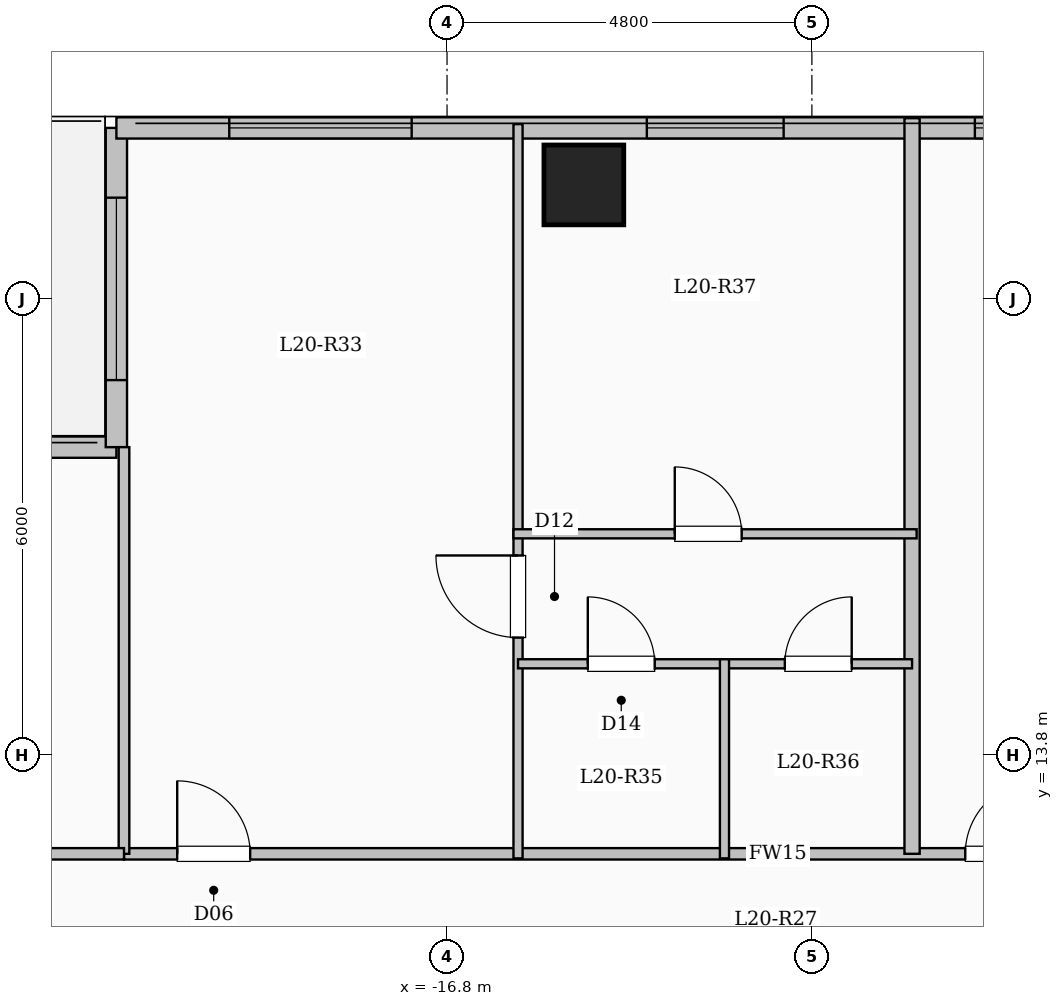
"""IFC4 building model, lengths in metres.
Left out: names, types, materials, properties, quantities, classifications, styles, units other than length and angle.
Written with IfcOpenShell. Run it as: python <this file> out.ifc"""

import sys

from ifc_helpers import new_model, si_unit, direction, frame, frame_2d, origin, origin_2d, place, context, subcontext, project, spatial, rectangle, extrude, element, fill, save


model = new_model("IFC4")
c1 = context("Model", 3, precision=1e-05, world=origin(), true_north=direction((0.0, 1.0)))
c2 = subcontext(c1, "Body", "Model", "MODEL_VIEW")
j1 = project(units=[si_unit("LENGTHUNIT", "METRE"), si_unit("PLANEANGLEUNIT", "RADIAN")], contexts=[c1])
p1 = place(None, origin())
s1 = spatial("IfcSite", under=j1, at=p1, CompositionType="ELEMENT")
p2 = place(p1, origin())
s2 = spatial("IfcBuilding", under=s1, at=p2, CompositionType="ELEMENT")
p3 = place(p2, frame((0.0, 0.0, 78.3)))
s3 = spatial("IfcBuildingStorey", under=s2, at=p3, CompositionType="ELEMENT", Elevation=78.3)
p4 = place(p3, frame((-15.0, 21.3, 0.0), z_axis=(0.0, 0.0, 1.0), x_axis=(1.0, 0.0, 0.0)))
e1 = element("IfcColumn", 1, at=p4, inside=s3, PredefinedType="COLUMN", context=c2, shape_type="SweptSolid", body=[
    extrude(rectangle(XDim=1.05, YDim=1.05, at=origin_2d()), origin(), (0.0, 0.0, 1.0), 3.35),
])
p5 = place(p3, frame((-26.85, 17.85, 0.0), z_axis=(0.0, 0.0, 1.0), x_axis=(1.0, 0.0, 0.0)))
e2 = element("IfcWall", 2, at=p5, inside=s3, PredefinedType="SOLIDWALL", context=c2, shape_type="SweptSolid", body=[
    extrude(rectangle(XDim=5.7, YDim=0.28, at=frame_2d((2.85, 0.0))), origin(), (0.0, 0.0, 1.0), 3.1),
])
p6 = place(p5, frame((2.5, 0.0, 0.0)))
e3 = element("IfcOpeningElement", 3, at=p6, cuts=e2, PredefinedType="OPENING", context=c2, shape_type="SweptSolid", body=[
    extrude(rectangle(XDim=1.1, YDim=2.2, at=frame_2d((0.55, 1.1))), frame((0.0, 0.15, 0.0), z_axis=(0.0, -1.0, 0.0), x_axis=(1.0, 0.0, 0.0)), (0.0, 0.0, 1.0), 0.3),
])
p7 = place(p5, frame((0.755, 0.0, 0.95)))
e4 = element("IfcOpeningElement", 4, at=p7, cuts=e2, PredefinedType="OPENING", context=c2, shape_type="SweptSolid", body=[
    extrude(rectangle(XDim=1.2, YDim=1.5, at=frame_2d((0.6, 0.75))), frame((0.0, 0.15, 0.0), z_axis=(0.0, -1.0, 0.0), x_axis=(1.0, 0.0, 0.0)), (0.0, 0.0, 1.0), 0.3),
])
p8 = place(p3, frame((-21.15, 17.85, 0.0), z_axis=(0.0, 0.0, 1.0), x_axis=(0.0, 1.0, 0.0)))
e5 = element("IfcWall", 5, at=p8, inside=s3, PredefinedType="SOLIDWALL", context=c2, shape_type="SweptSolid", body=[
    extrude(rectangle(XDim=4.2, YDim=0.28, at=frame_2d((2.1, 0.0))), origin(), (0.0, 0.0, 1.0), 3.1),
])
p9 = place(p8, frame((0.882, 0.0, 0.9)))
e6 = element("IfcOpeningElement", 6, at=p9, cuts=e5, PredefinedType="OPENING", context=c2, shape_type="SweptSolid", body=[
    extrude(rectangle(XDim=2.4, YDim=1.8, at=frame_2d((1.2, 0.9))), frame((0.0, 0.15, 0.0), z_axis=(0.0, -1.0, 0.0), x_axis=(1.0, 0.0, 0.0)), (0.0, 0.0, 1.0), 0.3),
])
p10 = place(p3, frame((-21.15, 22.05, 0.0), z_axis=(0.0, 0.0, 1.0), x_axis=(1.0, 0.0, 0.0)))
e7 = element("IfcWall", 7, at=p10, inside=s3, PredefinedType="SOLIDWALL", context=c2, shape_type="SweptSolid", body=[
    extrude(rectangle(XDim=13.8, YDim=0.28, at=frame_2d((6.9, 0.0))), origin(), (0.0, 0.0, 1.0), 3.1),
])
p11 = place(p10, frame((1.485, 0.0, 0.9)))
e8 = element("IfcOpeningElement", 8, at=p11, cuts=e7, PredefinedType="OPENING", context=c2, shape_type="SweptSolid", body=[
    extrude(rectangle(XDim=2.4, YDim=1.8, at=frame_2d((1.2, 0.9))), frame((0.0, 0.15, 0.0), z_axis=(0.0, -1.0, 0.0), x_axis=(1.0, 0.0, 0.0)), (0.0, 0.0, 1.0), 0.3),
])
p12 = place(p10, frame((6.979, 0.0, 0.9)))
e9 = element("IfcOpeningElement", 9, at=p12, cuts=e7, PredefinedType="OPENING", context=c2, shape_type="SweptSolid", body=[
    extrude(rectangle(XDim=1.8, YDim=1.65, at=frame_2d((0.9, 0.825))), frame((0.0, 0.15, 0.0), z_axis=(0.0, -1.0, 0.0), x_axis=(1.0, 0.0, 0.0)), (0.0, 0.0, 1.0), 0.3),
])
p13 = place(p10, frame((11.294, 0.0, 0.9)))
e10 = element("IfcOpeningElement", 10, at=p13, cuts=e7, PredefinedType="OPENING", context=c2, shape_type="SweptSolid", body=[
    extrude(rectangle(XDim=1.8, YDim=1.65, at=frame_2d((0.9, 0.825))), frame((0.0, 0.15, 0.0), z_axis=(0.0, -1.0, 0.0), x_axis=(1.0, 0.0, 0.0)), (0.0, 0.0, 1.0), 0.3),
])
p14 = place(p3, frame((-21.05, 12.5, 0.0), z_axis=(0.0, 0.0, 1.0), x_axis=(1.0, 0.0, 0.0)))
e11 = element("IfcWall", 11, at=p14, inside=s3, PredefinedType="PARTITIONING", context=c2, shape_type="SweptSolid", body=[
    extrude(rectangle(XDim=17.2, YDim=0.15, at=frame_2d((8.6, 0.0))), origin(), (0.0, 0.0, 1.0), 3.1),
])
p15 = place(p14, frame((0.7, 0.0, 0.0)))
e12 = element("IfcOpeningElement", 12, at=p15, cuts=e11, PredefinedType="OPENING", context=c2, shape_type="SweptSolid", body=[
    extrude(rectangle(XDim=0.96, YDim=2.15, at=frame_2d((0.48, 1.075))), frame((0.0, 0.085, 0.0), z_axis=(0.0, -1.0, 0.0), x_axis=(1.0, 0.0, 0.0)), (0.0, 0.0, 1.0), 0.17),
])
p16 = place(p14, frame((11.068, 0.0, 0.0)))
e13 = element("IfcOpeningElement", 13, at=p16, cuts=e11, PredefinedType="OPENING", context=c2, shape_type="SweptSolid", body=[
    extrude(rectangle(XDim=0.96, YDim=2.15, at=frame_2d((0.48, 1.075))), frame((0.0, 0.085, 0.0), z_axis=(0.0, -1.0, 0.0), x_axis=(1.0, 0.0, 0.0)), (0.0, 0.0, 1.0), 0.17),
])
p17 = place(p3, frame((-10.682, 12.5, 0.0), z_axis=(0.0, 0.0, 1.0), x_axis=(0.0, 1.0, 0.0)))
e14 = element("IfcWall", 14, at=p17, inside=s3, PredefinedType="SOLIDWALL", context=c2, shape_type="SweptSolid", body=[
    extrude(rectangle(XDim=9.678, YDim=0.2, at=frame_2d((4.839, 0.0))), origin(), (0.0, 0.0, 1.0), 3.1),
])
p18 = place(p3, frame((-15.866, 12.44, 0.0), z_axis=(0.0, 0.0, 1.0), x_axis=(0.0, 1.0, 0.0)))
e15 = element("IfcWall", 15, at=p18, inside=s3, PredefinedType="PARTITIONING", context=c2, shape_type="SweptSolid", body=[
    extrude(rectangle(XDim=9.66, YDim=0.12, at=frame_2d((4.83, 0.0))), origin(), (0.0, 0.0, 1.0), 3.1),
])
p19 = place(p18, frame((2.905, 0.0, 0.0)))
e16 = element("IfcOpeningElement", 16, at=p19, cuts=e15, PredefinedType="OPENING", context=c2, shape_type="SweptSolid", body=[
    extrude(rectangle(XDim=1.08, YDim=2.15, at=frame_2d((0.54, 1.075))), frame((0.0, 0.07, 0.0), z_axis=(0.0, -1.0, 0.0), x_axis=(1.0, 0.0, 0.0)), (0.0, 0.0, 1.0), 0.14),
])
p20 = place(p3, frame((-15.866, 15.0, 0.0), z_axis=(0.0, 0.0, 1.0), x_axis=(1.0, 0.0, 0.0)))
e17 = element("IfcWall", 17, at=p20, inside=s3, PredefinedType="PARTITIONING", context=c2, shape_type="SweptSolid", body=[
    extrude(rectangle(XDim=2.716, YDim=0.12, at=frame_2d((1.358, 0.0))), origin(), (0.0, 0.0, 1.0), 3.1),
])
p21 = place(p20, frame((0.918, 0.0, 0.0)))
e18 = element("IfcOpeningElement", 18, at=p21, cuts=e17, PredefinedType="OPENING", context=c2, shape_type="SweptSolid", body=[
    extrude(rectangle(XDim=0.88, YDim=2.1, at=frame_2d((0.44, 1.05))), frame((0.0, 0.07, 0.0), z_axis=(0.0, -1.0, 0.0), x_axis=(1.0, 0.0, 0.0)), (0.0, 0.0, 1.0), 0.14),
])
p22 = place(p3, frame((-13.15, 15.0, 0.0), z_axis=(0.0, 0.0, 1.0), x_axis=(1.0, 0.0, 0.0)))
e19 = element("IfcWall", 19, at=p22, inside=s3, PredefinedType="PARTITIONING", context=c2, shape_type="SweptSolid", body=[
    extrude(rectangle(XDim=2.468, YDim=0.12, at=frame_2d((1.234, 0.0))), origin(), (0.0, 0.0, 1.0), 3.1),
])
p23 = place(p22, frame((0.794, 0.0, 0.0)))
e20 = element("IfcOpeningElement", 20, at=p23, cuts=e19, PredefinedType="OPENING", context=c2, shape_type="SweptSolid", body=[
    extrude(rectangle(XDim=0.88, YDim=2.1, at=frame_2d((0.44, 1.05))), frame((0.0, 0.07, 0.0), z_axis=(0.0, -1.0, 0.0), x_axis=(1.0, 0.0, 0.0)), (0.0, 0.0, 1.0), 0.14),
])
p24 = place(p3, frame((-15.926, 16.71, 0.0), z_axis=(0.0, 0.0, 1.0), x_axis=(1.0, 0.0, 0.0)))
e21 = element("IfcWall", 21, at=p24, inside=s3, PredefinedType="PARTITIONING", context=c2, shape_type="SweptSolid", body=[
    extrude(rectangle(XDim=5.304, YDim=0.12, at=frame_2d((2.652, 0.0))), origin(), (0.0, 0.0, 1.0), 3.1),
])
p25 = place(p24, frame((2.122, 0.0, 0.0)))
e22 = element("IfcOpeningElement", 22, at=p25, cuts=e21, PredefinedType="OPENING", context=c2, shape_type="SweptSolid", body=[
    extrude(rectangle(XDim=0.88, YDim=2.1, at=frame_2d((0.44, 1.05))), frame((0.0, 0.07, 0.0), z_axis=(0.0, -1.0, 0.0), x_axis=(1.0, 0.0, 0.0)), (0.0, 0.0, 1.0), 0.14),
])
p26 = place(p3, frame((-13.15, 12.44, 0.0), z_axis=(0.0, 0.0, 1.0), x_axis=(0.0, 1.0, 0.0)))
e23 = element("IfcWall", 23, at=p26, inside=s3, PredefinedType="PARTITIONING", context=c2, shape_type="SweptSolid", body=[
    extrude(rectangle(XDim=2.62, YDim=0.12, at=frame_2d((1.31, 0.0))), origin(), (0.0, 0.0, 1.0), 3.1),
])
p27 = place(p3, frame((-21.05, 12.5, 0.0), z_axis=(0.0, 0.0, 1.0), x_axis=(0.0, 1.0, 0.0)))
e24 = element("IfcWall", 24, at=p27, inside=s3, PredefinedType="PARTITIONING", context=c2, shape_type="SweptSolid", body=[
    extrude(rectangle(XDim=5.35, YDim=0.14, at=frame_2d((2.675, 0.0))), origin(), (0.0, 0.0, 1.0), 3.1),
])
p28 = place(p3, frame((-26.88, 12.5, 0.0), z_axis=(0.0, 0.0, 1.0), x_axis=(1.0, 0.0, 0.0)))
e25 = element("IfcWall", 25, at=p28, inside=s3, PredefinedType="PARTITIONING", context=c2, shape_type="SweptSolid", body=[
    extrude(rectangle(XDim=5.83, YDim=0.15, at=frame_2d((2.915, 0.0))), origin(), (0.0, 0.0, 1.0), 3.1),
])
p29 = place(p28, frame((2.44, 0.0, 0.0)))
e26 = element("IfcOpeningElement", 26, at=p29, cuts=e25, PredefinedType="OPENING", context=c2, shape_type="SweptSolid", body=[
    extrude(rectangle(XDim=0.95, YDim=2.15, at=frame_2d((0.475, 1.075))), frame((0.0, 0.085, 0.0), z_axis=(0.0, -1.0, 0.0), x_axis=(1.0, 0.0, 0.0)), (0.0, 0.0, 1.0), 0.17),
])
p30 = place(p9, origin())
e27 = element("IfcWindow", 27, at=p30, inside=s3, PartitioningType="SINGLE_PANEL", PredefinedType="WINDOW", context=c2, shape_type="SweptSolid", body=[
    extrude(rectangle(XDim=2.4, YDim=1.8, at=frame_2d((1.2, 0.9))), frame((0.0, 0.03, 0.0), z_axis=(0.0, -1.0, 0.0), x_axis=(1.0, 0.0, 0.0)), (0.0, 0.0, 1.0), 0.06),
])
fill(e6, e27)
p31 = place(p11, origin())
e28 = element("IfcWindow", 28, at=p31, inside=s3, PartitioningType="SINGLE_PANEL", PredefinedType="WINDOW", context=c2, shape_type="SweptSolid", body=[
    extrude(rectangle(XDim=2.4, YDim=1.8, at=frame_2d((1.2, 0.9))), frame((0.0, 0.03, 0.0), z_axis=(0.0, -1.0, 0.0), x_axis=(1.0, 0.0, 0.0)), (0.0, 0.0, 1.0), 0.06),
])
fill(e8, e28)
p32 = place(p12, origin())
e29 = element("IfcWindow", 29, at=p32, inside=s3, PartitioningType="SINGLE_PANEL", PredefinedType="WINDOW", context=c2, shape_type="SweptSolid", body=[
    extrude(rectangle(XDim=1.8, YDim=1.65, at=frame_2d((0.9, 0.825))), frame((0.0, 0.03, 0.0), z_axis=(0.0, -1.0, 0.0), x_axis=(1.0, 0.0, 0.0)), (0.0, 0.0, 1.0), 0.06),
])
fill(e9, e29)
p33 = place(p13, origin())
e30 = element("IfcWindow", 30, at=p33, inside=s3, PartitioningType="SINGLE_PANEL", PredefinedType="WINDOW", context=c2, shape_type="SweptSolid", body=[
    extrude(rectangle(XDim=1.8, YDim=1.65, at=frame_2d((0.9, 0.825))), frame((0.0, 0.03, 0.0), z_axis=(0.0, -1.0, 0.0), x_axis=(1.0, 0.0, 0.0)), (0.0, 0.0, 1.0), 0.06),
])
fill(e10, e30)
p34 = place(p15, origin())
e31 = element("IfcDoor", 31, at=p34, inside=s3, OperationType="SINGLE_SWING_LEFT", PredefinedType="DOOR", context=c2, shape_type="SweptSolid", body=[
    extrude(rectangle(XDim=0.96, YDim=2.15, at=frame_2d((0.48, 1.075))), frame((0.0, 0.025, 0.0), z_axis=(0.0, -1.0, 0.0), x_axis=(1.0, 0.0, 0.0)), (0.0, 0.0, 1.0), 0.05),
])
fill(e12, e31)
p35 = place(p19, origin())
e32 = element("IfcDoor", 32, at=p35, inside=s3, OperationType="SINGLE_SWING_RIGHT", PredefinedType="DOOR", context=c2, shape_type="SweptSolid", body=[
    extrude(rectangle(XDim=1.08, YDim=2.15, at=frame_2d((0.54, 1.075))), frame((0.0, 0.025, 0.0), z_axis=(0.0, -1.0, 0.0), x_axis=(1.0, 0.0, 0.0)), (0.0, 0.0, 1.0), 0.05),
])
fill(e16, e32)
p36 = place(p21, origin())
e33 = element("IfcDoor", 33, at=p36, inside=s3, OperationType="SINGLE_SWING_LEFT", PredefinedType="DOOR", context=c2, shape_type="SweptSolid", body=[
    extrude(rectangle(XDim=0.88, YDim=2.1, at=frame_2d((0.44, 1.05))), frame((0.0, 0.025, 0.0), z_axis=(0.0, -1.0, 0.0), x_axis=(1.0, 0.0, 0.0)), (0.0, 0.0, 1.0), 0.05),
])
fill(e18, e33)
p37 = place(p23, origin())
e34 = element("IfcDoor", 34, at=p37, inside=s3, OperationType="SINGLE_SWING_RIGHT", PredefinedType="DOOR", context=c2, shape_type="SweptSolid", body=[
    extrude(rectangle(XDim=0.88, YDim=2.1, at=frame_2d((0.44, 1.05))), frame((0.0, 0.025, 0.0), z_axis=(0.0, -1.0, 0.0), x_axis=(1.0, 0.0, 0.0)), (0.0, 0.0, 1.0), 0.05),
])
fill(e20, e34)
p38 = place(p25, origin())
e35 = element("IfcDoor", 35, at=p38, inside=s3, OperationType="SINGLE_SWING_LEFT", PredefinedType="DOOR", context=c2, shape_type="SweptSolid", body=[
    extrude(rectangle(XDim=0.88, YDim=2.1, at=frame_2d((0.44, 1.05))), frame((0.0, 0.025, 0.0), z_axis=(0.0, -1.0, 0.0), x_axis=(1.0, 0.0, 0.0)), (0.0, 0.0, 1.0), 0.05),
])
fill(e22, e35)
p39 = place(p16, origin())
e36 = element("IfcDoor", 36, at=p39, inside=s3, OperationType="SINGLE_SWING_RIGHT", PredefinedType="DOOR", context=c2, shape_type="SweptSolid", body=[
    extrude(rectangle(XDim=0.96, YDim=2.15, at=frame_2d((0.48, 1.075))), frame((0.0, 0.025, 0.0), z_axis=(0.0, -1.0, 0.0), x_axis=(1.0, 0.0, 0.0)), (0.0, 0.0, 1.0), 0.05),
])
fill(e13, e36)
save(model, sys.argv[1])
